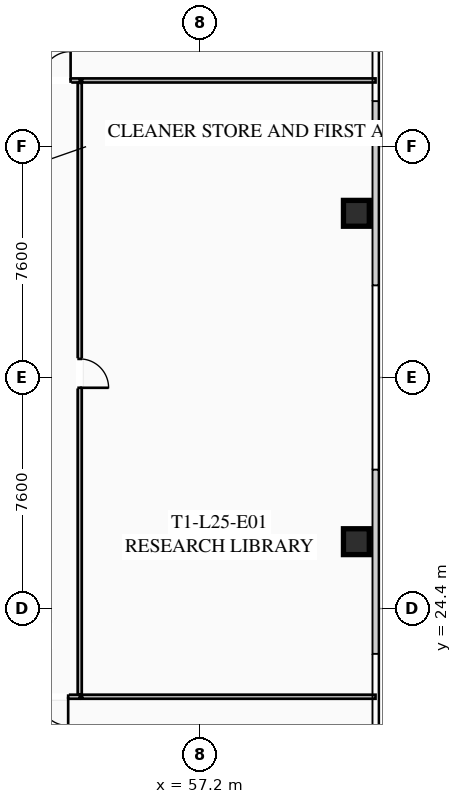
"""IFC4 building model, lengths in metres.
Left out: names, types, materials, properties, quantities, classifications, styles, units other than length and angle.
Written with IfcOpenShell. Run it as: python <this file> out.ifc"""

import sys

from ifc_helpers import new_model, si_unit, direction, frame, frame_2d, origin, origin_2d, place, context, subcontext, project, spatial, rectangle, hollow_rectangle, extrude, element, fill, save


model = new_model("IFC4")
c1 = context("Model", 3, precision=1e-05, world=origin(), true_north=direction((0.0, 1.0)))
c2 = subcontext(c1, "Body", "Model", "MODEL_VIEW")
j1 = project(units=[si_unit("LENGTHUNIT", "METRE"), si_unit("PLANEANGLEUNIT", "RADIAN")], contexts=[c1])
p1 = place(None, origin())
s1 = spatial("IfcSite", under=j1, at=p1, CompositionType="ELEMENT")
p2 = place(p1, origin())
s2 = spatial("IfcBuilding", under=s1, at=p2, CompositionType="ELEMENT")
p3 = place(p2, frame((0.0, 0.0, 95.6)))
s3 = spatial("IfcBuildingStorey", under=s2, at=p3, CompositionType="ELEMENT", Elevation=95.6)
for number, where, z_axis, x_axis in (
    (1, (62.35, 26.6, 0.0), (0.0, 0.0, 1.0), (1.0, 0.0, 0.0)),
    (2, (62.35, 37.4, 0.0), (0.0, 0.0, 1.0), (1.0, 0.0, 0.0)),
):
    element("IfcColumn", number, at=place(p3, frame(where, z_axis=z_axis, x_axis=x_axis)), inside=s3, PredefinedType="COLUMN", context=c2, shape_type="SweptSolid", body=[
        extrude(hollow_rectangle(XDim=0.85, YDim=0.85, WallThickness=0.035, at=origin_2d()), origin(), (0.0, 0.0, 1.0), 3.35),
    ])
p4 = place(p3, frame((24.05, 41.77, 0.0), z_axis=(0.0, 0.0, 1.0), x_axis=(1.0, 0.0, 0.0)))
e3 = element("IfcWall", 3, at=p4, inside=s3, PredefinedType="PARTITIONING", context=c2, shape_type="SweptSolid", body=[
    extrude(rectangle(XDim=29.2, YDim=0.135, at=frame_2d((14.6, 0.0))), origin(), (0.0, 0.0, 1.0), 2.703),
])
p5 = place(p4, frame((0.3, 0.0, 0.0)))
e4 = element("IfcOpeningElement", 4, at=p5, cuts=e3, PredefinedType="OPENING", context=c2, shape_type="SweptSolid", body=[
    extrude(rectangle(XDim=0.95, YDim=2.05, at=frame_2d((0.475, 1.025))), frame((0.0, 0.077, 0.0), z_axis=(0.0, -1.0, 0.0), x_axis=(1.0, 0.0, 0.0)), (0.0, 0.0, 1.0), 0.155),
])
p6 = place(p4, frame((13.559, 0.0, 0.0)))
e5 = element("IfcOpeningElement", 5, at=p6, cuts=e3, PredefinedType="OPENING", context=c2, shape_type="SweptSolid", body=[
    extrude(rectangle(XDim=0.95, YDim=2.05, at=frame_2d((0.475, 1.025))), frame((0.0, 0.077, 0.0), z_axis=(0.0, -1.0, 0.0), x_axis=(1.0, 0.0, 0.0)), (0.0, 0.0, 1.0), 0.155),
])
p7 = place(p4, frame((17.605, 0.0, 0.0)))
e6 = element("IfcOpeningElement", 6, at=p7, cuts=e3, PredefinedType="OPENING", context=c2, shape_type="SweptSolid", body=[
    extrude(rectangle(XDim=0.95, YDim=2.05, at=frame_2d((0.475, 1.025))), frame((0.0, 0.077, 0.0), z_axis=(0.0, -1.0, 0.0), x_axis=(1.0, 0.0, 0.0)), (0.0, 0.0, 1.0), 0.155),
])
p8 = place(p4, frame((21.649, 0.0, 0.0)))
e7 = element("IfcOpeningElement", 7, at=p8, cuts=e3, PredefinedType="OPENING", context=c2, shape_type="SweptSolid", body=[
    extrude(rectangle(XDim=0.95, YDim=2.05, at=frame_2d((0.475, 1.025))), frame((0.0, 0.077, 0.0), z_axis=(0.0, -1.0, 0.0), x_axis=(1.0, 0.0, 0.0)), (0.0, 0.0, 1.0), 0.155),
])
p9 = place(p4, frame((27.95, 0.0, 0.0)))
e8 = element("IfcOpeningElement", 8, at=p9, cuts=e3, PredefinedType="OPENING", context=c2, shape_type="SweptSolid", body=[
    extrude(rectangle(XDim=0.95, YDim=2.05, at=frame_2d((0.475, 1.025))), frame((0.0, 0.077, 0.0), z_axis=(0.0, -1.0, 0.0), x_axis=(1.0, 0.0, 0.0)), (0.0, 0.0, 1.0), 0.155),
])
p10 = place(p3, frame((53.25, 21.5, 0.0), z_axis=(0.0, 0.0, 1.0), x_axis=(-1.0, 0.0, 0.0)))
e9 = element("IfcWall", 9, at=p10, inside=s3, PredefinedType="PARTITIONING", context=c2, shape_type="SweptSolid", body=[
    extrude(rectangle(XDim=29.2, YDim=0.135, at=frame_2d((14.6, 0.0))), origin(), (0.0, 0.0, 1.0), 2.703),
])
p11 = place(p10, frame((27.87, 0.0, 0.0)))
e10 = element("IfcOpeningElement", 10, at=p11, cuts=e9, PredefinedType="OPENING", context=c2, shape_type="SweptSolid", body=[
    extrude(rectangle(XDim=0.95, YDim=2.05, at=frame_2d((0.475, 1.025))), frame((0.0, 0.077, 0.0), z_axis=(0.0, -1.0, 0.0), x_axis=(1.0, 0.0, 0.0)), (0.0, 0.0, 1.0), 0.155),
])
p12 = place(p10, frame((10.492, 0.0, 0.0)))
e11 = element("IfcOpeningElement", 11, at=p12, cuts=e9, PredefinedType="OPENING", context=c2, shape_type="SweptSolid", body=[
    extrude(rectangle(XDim=0.95, YDim=2.05, at=frame_2d((0.475, 1.025))), frame((0.0, 0.077, 0.0), z_axis=(0.0, -1.0, 0.0), x_axis=(1.0, 0.0, 0.0)), (0.0, 0.0, 1.0), 0.155),
])
p13 = place(p10, frame((0.38, 0.0, 0.0)))
e12 = element("IfcOpeningElement", 12, at=p13, cuts=e9, PredefinedType="OPENING", context=c2, shape_type="SweptSolid", body=[
    extrude(rectangle(XDim=0.95, YDim=2.05, at=frame_2d((0.475, 1.025))), frame((0.0, 0.077, 0.0), z_axis=(0.0, -1.0, 0.0), x_axis=(1.0, 0.0, 0.0)), (0.0, 0.0, 1.0), 0.155),
])
p14 = place(p3, frame((53.25, 41.69, 0.0), z_axis=(0.0, 0.0, 1.0), x_axis=(0.0, -1.0, 0.0)))
e13 = element("IfcWall", 13, at=p14, inside=s3, PredefinedType="PARTITIONING", context=c2, shape_type="SweptSolid", body=[
    extrude(rectangle(XDim=20.11, YDim=0.135, at=frame_2d((10.055, 0.0))), origin(), (0.0, 0.0, 1.0), 2.703),
])
p15 = place(p14, frame((9.078, 0.0, 0.0)))
e14 = element("IfcOpeningElement", 14, at=p15, cuts=e13, PredefinedType="OPENING", context=c2, shape_type="SweptSolid", body=[
    extrude(rectangle(XDim=0.95, YDim=2.05, at=frame_2d((0.475, 1.025))), frame((0.0, 0.077, 0.0), z_axis=(0.0, -1.0, 0.0), x_axis=(1.0, 0.0, 0.0)), (0.0, 0.0, 1.0), 0.155),
])
for number, where, z_axis, x_axis in (
    (15, (62.98, 41.77, 0.0), (0.0, 0.0, 1.0), (-1.0, 0.0, 0.0)),
    (16, (53.33, 21.5, 0.0), (0.0, 0.0, 1.0), (1.0, 0.0, 0.0)),
):
    element("IfcWall", number, at=place(p3, frame(where, z_axis=z_axis, x_axis=x_axis)), inside=s3, PredefinedType="PARTITIONING", context=c2, shape_type="SweptSolid", body=[
        extrude(rectangle(XDim=9.65, YDim=0.135, at=frame_2d((4.825, 0.0))), origin(), (0.0, 0.0, 1.0), 2.703),
    ])
p16 = place(p9, origin())
e17 = element("IfcDoor", 17, at=p16, inside=s3, OperationType="SINGLE_SWING_RIGHT", PredefinedType="DOOR", context=c2, shape_type="SweptSolid", body=[
    extrude(rectangle(XDim=0.95, YDim=2.05, at=frame_2d((0.475, 1.025))), frame((0.0, 0.025, 0.0), z_axis=(0.0, -1.0, 0.0), x_axis=(1.0, 0.0, 0.0)), (0.0, 0.0, 1.0), 0.05),
])
fill(e8, e17)
p17 = place(p13, origin())
e18 = element("IfcDoor", 18, at=p17, inside=s3, OperationType="SINGLE_SWING_LEFT", PredefinedType="DOOR", context=c2, shape_type="SweptSolid", body=[
    extrude(rectangle(XDim=0.95, YDim=2.05, at=frame_2d((0.475, 1.025))), frame((0.0, 0.025, 0.0), z_axis=(0.0, -1.0, 0.0), x_axis=(1.0, 0.0, 0.0)), (0.0, 0.0, 1.0), 0.05),
])
fill(e12, e18)
p18 = place(p15, origin())
e19 = element("IfcDoor", 19, at=p18, inside=s3, OperationType="SINGLE_SWING_RIGHT", PredefinedType="DOOR", context=c2, shape_type="SweptSolid", body=[
    extrude(rectangle(XDim=0.95, YDim=2.05, at=frame_2d((0.475, 1.025))), frame((0.0, 0.025, 0.0), z_axis=(0.0, -1.0, 0.0), x_axis=(1.0, 0.0, 0.0)), (0.0, 0.0, 1.0), 0.05),
])
fill(e14, e19)
save(model, sys.argv[1])
